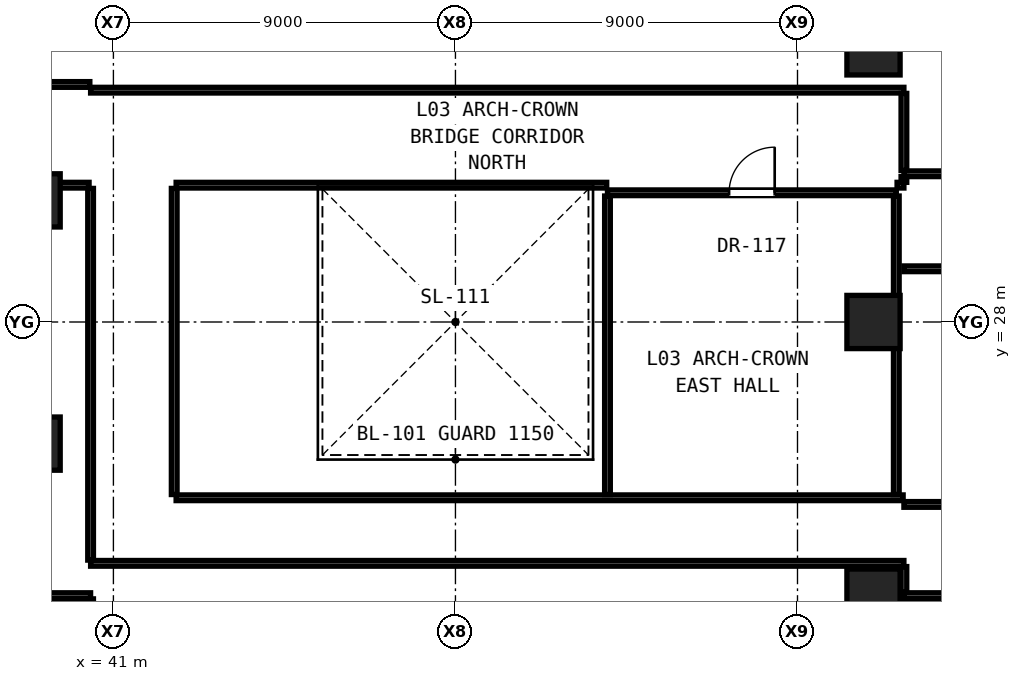
"""IFC4 building model, lengths in metres.
Left out: names, types, materials, properties, quantities, classifications, styles, units other than length and angle.
Written with IfcOpenShell. Run it as: python <this file> out.ifc"""

import sys

from ifc_helpers import new_model, si_unit, direction, frame, frame_2d, origin, origin_2d, place, context, subcontext, project, spatial, rectangle, hollow_rectangle, extrude, element, fill, save


model = new_model("IFC4")
c1 = context("Model", 3, precision=1e-05, world=origin(), true_north=direction((0.0, 1.0)))
c2 = subcontext(c1, "Body", "Model", "MODEL_VIEW")
j1 = project(units=[si_unit("LENGTHUNIT", "METRE"), si_unit("PLANEANGLEUNIT", "RADIAN")], contexts=[c1])
p1 = place(None, origin())
s1 = spatial("IfcSite", under=j1, at=p1, CompositionType="ELEMENT")
p2 = place(p1, origin())
s2 = spatial("IfcBuilding", under=s1, at=p2, CompositionType="ELEMENT")
p3 = place(p2, frame((0.0, 0.0, 13.8)))
s3 = spatial("IfcBuildingStorey", under=s2, at=p3, CompositionType="ELEMENT", Elevation=13.8)
for number, where, z_axis, x_axis in (
    (1, (38.9, 24.8, 0.0), (0.0, 0.0, 1.0), (1.0, 0.0, 0.0)),
    (2, (38.9, 31.2, 0.0), (0.0, 0.0, 1.0), (1.0, 0.0, 0.0)),
    (3, (61.0, 20.8, 0.0), (0.0, 0.0, 1.0), (1.0, 0.0, 0.0)),
    (4, (61.0, 28.0, 0.0), (0.0, 0.0, 1.0), (1.0, 0.0, 0.0)),
    (5, (61.0, 35.2, 0.0), (0.0, 0.0, 1.0), (1.0, 0.0, 0.0)),
):
    element("IfcColumn", number, at=place(p3, frame(where, z_axis=z_axis, x_axis=x_axis)), inside=s3, PredefinedType="COLUMN", context=c2, shape_type="SweptSolid", body=[
        extrude(hollow_rectangle(XDim=1.4, YDim=1.4, WallThickness=0.08, at=origin_2d()), origin(), (0.0, 0.0, 1.0), 4.3),
    ])
p4 = place(p3, frame((10.05, 20.8, 0.0), z_axis=(0.0, 0.0, 1.0), x_axis=(1.0, 0.0, 0.0)))
e6 = element("IfcWall", 6, at=p4, inside=s3, PredefinedType="PARTITIONING", context=c2, shape_type="SweptSolid", body=[
    extrude(rectangle(XDim=30.35, YDim=0.15, at=frame_2d((15.175, 0.0))), origin(), (0.0, 0.0, 1.0), 2.602),
])
p5 = place(p4, frame((0.995, 0.0, 0.0)))
e7 = element("IfcOpeningElement", 7, at=p5, cuts=e6, PredefinedType="OPENING", context=c2, shape_type="SweptSolid", body=[
    extrude(rectangle(XDim=0.9, YDim=2.1, at=frame_2d((0.45, 1.05))), frame((0.0, 0.085, 0.0), z_axis=(0.0, -1.0, 0.0), x_axis=(1.0, 0.0, 0.0)), (0.0, 0.0, 1.0), 0.17),
])
p6 = place(p4, frame((7.891, 0.0, 0.0)))
e8 = element("IfcOpeningElement", 8, at=p6, cuts=e6, PredefinedType="OPENING", context=c2, shape_type="SweptSolid", body=[
    extrude(rectangle(XDim=1.05, YDim=2.2, at=frame_2d((0.525, 1.1))), frame((0.0, 0.085, 0.0), z_axis=(0.0, -1.0, 0.0), x_axis=(1.0, 0.0, 0.0)), (0.0, 0.0, 1.0), 0.17),
])
p7 = place(p3, frame((61.8, 20.8, 0.0), z_axis=(0.0, 0.0, 1.0), x_axis=(1.0, 0.0, 0.0)))
e9 = element("IfcWall", 9, at=p7, inside=s3, PredefinedType="PARTITIONING", context=c2, shape_type="SweptSolid", body=[
    extrude(rectangle(XDim=5.83, YDim=0.15, at=frame_2d((2.915, 0.0))), origin(), (0.0, 0.0, 1.0), 2.542),
])
p8 = place(p3, frame((40.4, 21.65, 0.0), z_axis=(0.0, 0.0, 1.0), x_axis=(1.0, 0.0, 0.0)))
e10 = element("IfcWall", 10, at=p8, inside=s3, PredefinedType="PARTITIONING", context=c2, shape_type="SweptSolid", body=[
    extrude(rectangle(XDim=21.4, YDim=0.15, at=frame_2d((10.7, 0.0))), origin(), (0.0, 0.0, 1.0), 2.602),
])
p9 = place(p3, frame((61.8, 23.2, 0.0), z_axis=(0.0, 0.0, 1.0), x_axis=(1.0, 0.0, 0.0)))
e11 = element("IfcWall", 11, at=p9, inside=s3, PredefinedType="PARTITIONING", context=c2, shape_type="SweptSolid", body=[
    extrude(rectangle(XDim=29.15, YDim=0.15, at=frame_2d((14.575, 0.0))), origin(), (0.0, 0.0, 1.0), 2.715),
])
p10 = place(p9, frame((6.225, 0.0, 0.0)))
e12 = element("IfcOpeningElement", 12, at=p10, cuts=e11, PredefinedType="OPENING", context=c2, shape_type="SweptSolid", body=[
    extrude(rectangle(XDim=0.9, YDim=2.1, at=frame_2d((0.45, 1.05))), frame((0.0, 0.085, 0.0), z_axis=(0.0, -1.0, 0.0), x_axis=(1.0, 0.0, 0.0)), (0.0, 0.0, 1.0), 0.17),
])
p11 = place(p9, frame((10.824, 0.0, 0.0)))
e13 = element("IfcOpeningElement", 13, at=p11, cuts=e11, PredefinedType="OPENING", context=c2, shape_type="SweptSolid", body=[
    extrude(rectangle(XDim=1.05, YDim=2.2, at=frame_2d((0.525, 1.1))), frame((0.0, 0.085, 0.0), z_axis=(0.0, -1.0, 0.0), x_axis=(1.0, 0.0, 0.0)), (0.0, 0.0, 1.0), 0.17),
])
p12 = place(p3, frame((42.65, 23.375, 0.0), z_axis=(0.0, 0.0, 1.0), x_axis=(1.0, 0.0, 0.0)))
e14 = element("IfcWall", 14, at=p12, inside=s3, PredefinedType="PARTITIONING", context=c2, shape_type="SweptSolid", body=[
    extrude(rectangle(XDim=19.13, YDim=0.15, at=frame_2d((9.565, 0.0))), origin(), (0.0, 0.0, 1.0), 2.602),
])
p13 = place(p3, frame((61.8, 29.4, 0.0), z_axis=(0.0, 0.0, 1.0), x_axis=(1.0, 0.0, 0.0)))
e15 = element("IfcWall", 15, at=p13, inside=s3, PredefinedType="PARTITIONING", context=c2, shape_type="SweptSolid", body=[
    extrude(rectangle(XDim=7.93, YDim=0.15, at=frame_2d((3.965, 0.0))), origin(), (0.0, 0.0, 1.0), 2.715),
])
p14 = place(p3, frame((54.0, 31.4, 0.0), z_axis=(0.0, 0.0, 1.0), x_axis=(1.0, 0.0, 0.0)))
e16 = element("IfcWall", 16, at=p14, inside=s3, PredefinedType="PARTITIONING", context=c2, shape_type="SweptSolid", body=[
    extrude(rectangle(XDim=7.6, YDim=0.15, at=frame_2d((3.8, 0.0))), origin(), (0.0, 0.0, 1.0), 2.602),
])
p15 = place(p14, frame((3.2, 0.0, 0.0)))
e17 = element("IfcOpeningElement", 17, at=p15, cuts=e16, PredefinedType="OPENING", context=c2, shape_type="SweptSolid", body=[
    extrude(rectangle(XDim=1.2, YDim=2.25, at=frame_2d((0.6, 1.125))), frame((0.0, 0.085, 0.0), z_axis=(0.0, -1.0, 0.0), x_axis=(1.0, 0.0, 0.0)), (0.0, 0.0, 1.0), 0.17),
])
p16 = place(p3, frame((10.05, 31.6, 0.0), z_axis=(0.0, 0.0, 1.0), x_axis=(1.0, 0.0, 0.0)))
e18 = element("IfcWall", 18, at=p16, inside=s3, PredefinedType="PARTITIONING", context=c2, shape_type="SweptSolid", body=[
    extrude(rectangle(XDim=30.31, YDim=0.15, at=frame_2d((15.155, 0.0))), origin(), (0.0, 0.0, 1.0), 2.602),
])
p17 = place(p16, frame((20.541, 0.0, 0.0)))
e19 = element("IfcOpeningElement", 19, at=p17, cuts=e18, PredefinedType="OPENING", context=c2, shape_type="SweptSolid", body=[
    extrude(rectangle(XDim=1.05, YDim=2.2, at=frame_2d((0.525, 1.1))), frame((0.0, 0.085, 0.0), z_axis=(0.0, -1.0, 0.0), x_axis=(1.0, 0.0, 0.0)), (0.0, 0.0, 1.0), 0.17),
])
p18 = place(p3, frame((42.65, 31.6, 0.0), z_axis=(0.0, 0.0, 1.0), x_axis=(1.0, 0.0, 0.0)))
e20 = element("IfcWall", 20, at=p18, inside=s3, PredefinedType="PARTITIONING", context=c2, shape_type="SweptSolid", body=[
    extrude(rectangle(XDim=11.33, YDim=0.15, at=frame_2d((5.665, 0.0))), origin(), (0.0, 0.0, 1.0), 3.65),
])
p19 = place(p3, frame((61.62, 31.6, 0.0), z_axis=(0.0, 0.0, 1.0), x_axis=(1.0, 0.0, 0.0)))
e21 = element("IfcWall", 21, at=p19, inside=s3, PredefinedType="PARTITIONING", context=c2, shape_type="SweptSolid", body=[
    extrude(rectangle(XDim=0.18, YDim=0.15, at=frame_2d((0.09, 0.0))), origin(), (0.0, 0.0, 1.0), 3.65),
])
p20 = place(p3, frame((61.8, 31.9, 0.0), z_axis=(0.0, 0.0, 1.0), x_axis=(1.0, 0.0, 0.0)))
e22 = element("IfcWall", 22, at=p20, inside=s3, PredefinedType="PARTITIONING", context=c2, shape_type="SweptSolid", body=[
    extrude(rectangle(XDim=5.35, YDim=0.15, at=frame_2d((2.675, 0.0))), origin(), (0.0, 0.0, 1.0), 3.65),
])
p21 = place(p3, frame((40.4, 34.1, 0.0), z_axis=(0.0, 0.0, 1.0), x_axis=(1.0, 0.0, 0.0)))
e23 = element("IfcWall", 23, at=p21, inside=s3, PredefinedType="PARTITIONING", context=c2, shape_type="SweptSolid", body=[
    extrude(rectangle(XDim=21.4, YDim=0.15, at=frame_2d((10.7, 0.0))), origin(), (0.0, 0.0, 1.0), 2.602),
])
p22 = place(p3, frame((16.65, 34.25, 0.0), z_axis=(0.0, 0.0, 1.0), x_axis=(1.0, 0.0, 0.0)))
e24 = element("IfcWall", 24, at=p22, inside=s3, PredefinedType="PARTITIONING", context=c2, shape_type="SweptSolid", body=[
    extrude(rectangle(XDim=23.73, YDim=0.15, at=frame_2d((11.865, 0.0))), origin(), (0.0, 0.0, 1.0), 2.602),
])
p23 = place(p22, frame((5.2, 0.0, 0.0)))
e25 = element("IfcOpeningElement", 25, at=p23, cuts=e24, PredefinedType="OPENING", context=c2, shape_type="SweptSolid", body=[
    extrude(rectangle(XDim=1.2, YDim=2.25, at=frame_2d((0.6, 1.125))), frame((0.0, 0.085, 0.0), z_axis=(0.0, -1.0, 0.0), x_axis=(1.0, 0.0, 0.0)), (0.0, 0.0, 1.0), 0.17),
])
p24 = place(p22, frame((9.9, 0.0, 0.0)))
e26 = element("IfcOpeningElement", 26, at=p24, cuts=e24, PredefinedType="OPENING", context=c2, shape_type="SweptSolid", body=[
    extrude(rectangle(XDim=1.2, YDim=2.25, at=frame_2d((0.6, 1.125))), frame((0.0, 0.085, 0.0), z_axis=(0.0, -1.0, 0.0), x_axis=(1.0, 0.0, 0.0)), (0.0, 0.0, 1.0), 0.17),
])
p25 = place(p3, frame((40.4, 18.485, 0.0), z_axis=(0.0, 0.0, 1.0), x_axis=(0.0, 1.0, 0.0)))
e27 = element("IfcWall", 27, at=p25, inside=s3, PredefinedType="PARTITIONING", context=c2, shape_type="SweptSolid", body=[
    extrude(rectangle(XDim=2.23, YDim=0.15, at=frame_2d((1.115, 0.0))), origin(), (0.0, 0.0, 1.0), 2.694),
])
p26 = place(p3, frame((40.4, 21.735, 0.0), z_axis=(0.0, 0.0, 1.0), x_axis=(0.0, 1.0, 0.0)))
e28 = element("IfcWall", 28, at=p26, inside=s3, PredefinedType="PARTITIONING", context=c2, shape_type="SweptSolid", body=[
    extrude(rectangle(XDim=9.78, YDim=0.15, at=frame_2d((4.89, 0.0))), origin(), (0.0, 0.0, 1.0), 3.65),
])
p27 = place(p3, frame((42.6, 23.46, 0.0), z_axis=(0.0, 0.0, 1.0), x_axis=(0.0, 1.0, 0.0)))
e29 = element("IfcWall", 29, at=p27, inside=s3, PredefinedType="PARTITIONING", context=c2, shape_type="SweptSolid", body=[
    extrude(rectangle(XDim=8.055, YDim=0.15, at=frame_2d((4.027, 0.0))), origin(), (0.0, 0.0, 1.0), 3.65),
])
p28 = place(p3, frame((54.0, 23.46, 0.0), z_axis=(0.0, 0.0, 1.0), x_axis=(0.0, 1.0, 0.0)))
e30 = element("IfcWall", 30, at=p28, inside=s3, PredefinedType="PARTITIONING", context=c2, shape_type="SweptSolid", body=[
    extrude(rectangle(XDim=7.855, YDim=0.15, at=frame_2d((3.927, 0.0))), origin(), (0.0, 0.0, 1.0), 3.65),
])
p29 = place(p3, frame((61.6, 23.46, 0.0), z_axis=(0.0, 0.0, 1.0), x_axis=(0.0, 1.0, 0.0)))
e31 = element("IfcWall", 31, at=p29, inside=s3, PredefinedType="PARTITIONING", context=c2, shape_type="SweptSolid", body=[
    extrude(rectangle(XDim=7.855, YDim=0.15, at=frame_2d((3.927, 0.0))), origin(), (0.0, 0.0, 1.0), 2.869),
])
p30 = place(p3, frame((61.8, 20.885, 0.0), z_axis=(0.0, 0.0, 1.0), x_axis=(0.0, 1.0, 0.0)))
e32 = element("IfcWall", 32, at=p30, inside=s3, PredefinedType="PARTITIONING", context=c2, shape_type="SweptSolid", body=[
    extrude(rectangle(XDim=0.68, YDim=0.15, at=frame_2d((0.34, 0.0))), origin(), (0.0, 0.0, 1.0), 2.542),
])
p31 = place(p3, frame((61.8, 31.675, 0.0), z_axis=(0.0, 0.0, 1.0), x_axis=(0.0, 1.0, 0.0)))
e33 = element("IfcWall", 33, at=p31, inside=s3, PredefinedType="PARTITIONING", context=c2, shape_type="SweptSolid", body=[
    extrude(rectangle(XDim=0.15, YDim=0.15, at=frame_2d((0.075, 0.0))), origin(), (0.0, 0.0, 1.0), 3.65),
])
p32 = place(p3, frame((61.8, 31.985, 0.0), z_axis=(0.0, 0.0, 1.0), x_axis=(0.0, 1.0, 0.0)))
e34 = element("IfcWall", 34, at=p32, inside=s3, PredefinedType="PARTITIONING", context=c2, shape_type="SweptSolid", body=[
    extrude(rectangle(XDim=2.03, YDim=0.15, at=frame_2d((1.015, 0.0))), origin(), (0.0, 0.0, 1.0), 3.65),
])
p33 = place(p15, origin())
e35 = element("IfcDoor", 35, at=p33, inside=s3, OperationType="SINGLE_SWING_RIGHT", PredefinedType="DOOR", context=c2, shape_type="SweptSolid", body=[
    extrude(rectangle(XDim=1.2, YDim=2.25, at=frame_2d((0.6, 1.125))), frame((0.0, 0.025, 0.0), z_axis=(0.0, -1.0, 0.0), x_axis=(1.0, 0.0, 0.0)), (0.0, 0.0, 1.0), 0.05),
])
fill(e17, e35)
save(model, sys.argv[1])
